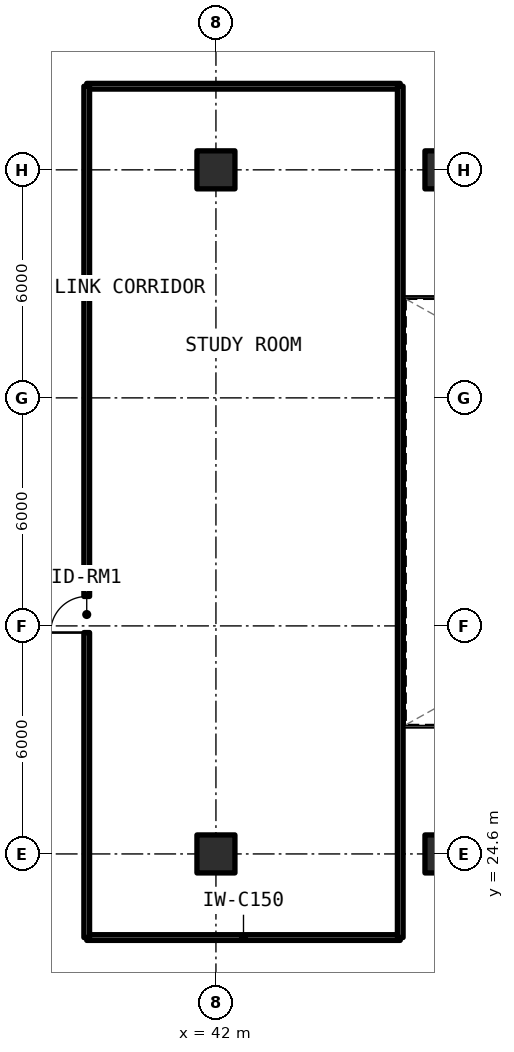
"""IFC4 building model, lengths in metres.
Left out: names, types, materials, properties, quantities, classifications, styles, units other than length and angle.
Written with IfcOpenShell. Run it as: python <this file> out.ifc"""

import sys

from ifc_helpers import new_model, si_unit, direction, frame, frame_2d, origin, origin_2d, place, context, subcontext, project, spatial, rectangle, extrude, element, fill, save


model = new_model("IFC4")
c1 = context("Model", 3, precision=1e-05, world=origin(), true_north=direction((0.0, 1.0)))
c2 = subcontext(c1, "Body", "Model", "MODEL_VIEW")
j1 = project(units=[si_unit("LENGTHUNIT", "METRE"), si_unit("PLANEANGLEUNIT", "RADIAN")], contexts=[c1])
p1 = place(None, origin())
s1 = spatial("IfcSite", under=j1, at=p1, CompositionType="ELEMENT")
p2 = place(p1, origin())
s2 = spatial("IfcBuilding", under=s1, at=p2, CompositionType="ELEMENT")
p3 = place(p2, frame((0.0, 0.0, 85.47)))
s3 = spatial("IfcBuildingStorey", under=s2, at=p3, CompositionType="ELEMENT", Elevation=85.47)
for number, where, z_axis, x_axis in (
    (1, (42.0, 24.6, 0.0), (0.0, 0.0, 1.0), (1.0, 0.0, 0.0)),
    (2, (42.0, 42.6, 0.0), (0.0, 0.0, 1.0), (1.0, 0.0, 0.0)),
    (3, (48.0, 24.6, 0.0), (0.0, 0.0, 1.0), (1.0, 0.0, 0.0)),
    (4, (48.0, 42.6, 0.0), (0.0, 0.0, 1.0), (1.0, 0.0, 0.0)),
):
    element("IfcColumn", number, at=place(p3, frame(where, z_axis=z_axis, x_axis=x_axis)), inside=s3, PredefinedType="COLUMN", context=c2, shape_type="SweptSolid", body=[
        extrude(rectangle(XDim=1.0, YDim=1.0, at=origin_2d()), origin(), (0.0, 0.0, 1.0), 3.3),
    ])
for number, where, z_axis, x_axis in (
    (5, (38.6, 22.4, 0.0), (0.0, 0.0, 1.0), (1.0, 0.0, 0.0)),
    (6, (38.6, 44.8, 0.0), (0.0, 0.0, 1.0), (1.0, 0.0, 0.0)),
):
    element("IfcWall", number, at=place(p3, frame(where, z_axis=z_axis, x_axis=x_axis)), inside=s3, PredefinedType="SOLIDWALL", context=c2, shape_type="SweptSolid", body=[
        extrude(rectangle(XDim=8.25, YDim=0.15, at=frame_2d((4.125, 0.0))), origin(), (0.0, 0.0, 1.0), 2.35),
    ])
p4 = place(p3, frame((38.6, 22.4, 0.0), z_axis=(0.0, 0.0, 1.0), x_axis=(0.0, 1.0, 0.0)))
e7 = element("IfcWall", 7, at=p4, inside=s3, PredefinedType="SOLIDWALL", context=c2, shape_type="SweptSolid", body=[
    extrude(rectangle(XDim=22.4, YDim=0.15, at=frame_2d((11.2, 0.0))), origin(), (0.0, 0.0, 1.0), 2.35),
])
p5 = place(p4, frame((8.025, 0.0, 0.0)))
e8 = element("IfcOpeningElement", 8, at=p5, cuts=e7, PredefinedType="OPENING", context=c2, shape_type="SweptSolid", body=[
    extrude(rectangle(XDim=0.95, YDim=2.15, at=frame_2d((0.475, 1.075))), frame((0.0, 0.085, 0.0), z_axis=(0.0, -1.0, 0.0), x_axis=(1.0, 0.0, 0.0)), (0.0, 0.0, 1.0), 0.17),
])
p6 = place(p3, frame((46.85, 22.4, 0.0), z_axis=(0.0, 0.0, 1.0), x_axis=(0.0, 1.0, 0.0)))
e9 = element("IfcWall", 9, at=p6, inside=s3, PredefinedType="SOLIDWALL", context=c2, shape_type="SweptSolid", body=[
    extrude(rectangle(XDim=22.4, YDim=0.15, at=frame_2d((11.2, 0.0))), origin(), (0.0, 0.0, 1.0), 2.35),
])
p7 = place(p5, origin())
e10 = element("IfcDoor", 10, at=p7, inside=s3, OperationType="SINGLE_SWING_LEFT", PredefinedType="DOOR", context=c2, shape_type="SweptSolid", body=[
    extrude(rectangle(XDim=0.95, YDim=2.15, at=frame_2d((0.475, 1.075))), frame((0.0, 0.025, 0.0), z_axis=(0.0, -1.0, 0.0), x_axis=(1.0, 0.0, 0.0)), (0.0, 0.0, 1.0), 0.05),
])
fill(e8, e10)
save(model, sys.argv[1])
